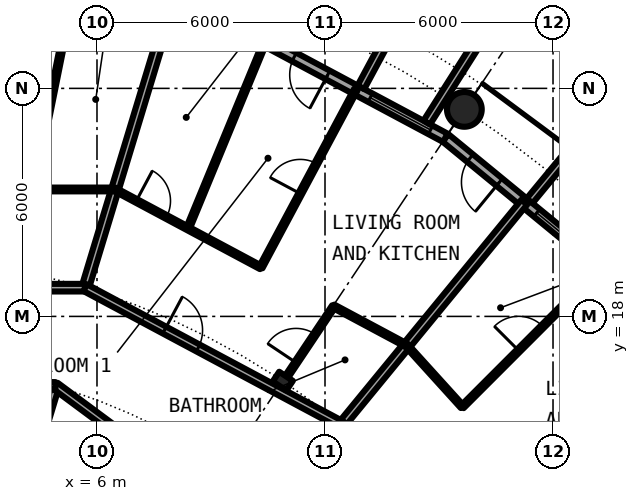
"""IFC4 building model, lengths in metres.
Left out: names, types, materials, properties, quantities, classifications, styles, units other than length and angle.
Written with IfcOpenShell. Run it as: python <this file> out.ifc"""

import sys

from ifc_helpers import new_model, si_unit, direction, frame, frame_2d, origin, origin_2d, place, context, subcontext, project, spatial, rectangle, hollow_circle, i_section, extrude, element, fill, save


model = new_model("IFC4")
c1 = context("Model", 3, precision=1e-05, world=origin(), true_north=direction((0.0, 1.0)))
c2 = subcontext(c1, "Body", "Model", "MODEL_VIEW")
j1 = project(units=[si_unit("LENGTHUNIT", "METRE"), si_unit("PLANEANGLEUNIT", "RADIAN")], contexts=[c1])
p1 = place(None, origin())
s1 = spatial("IfcSite", under=j1, at=p1, CompositionType="ELEMENT")
p2 = place(p1, origin())
s2 = spatial("IfcBuilding", under=s1, at=p2, CompositionType="ELEMENT")
p3 = place(p2, frame((0.0, 0.0, 117.75)))
s3 = spatial("IfcBuildingStorey", under=s2, at=p3, CompositionType="ELEMENT", Elevation=117.75)
p4 = place(p3, frame((15.667, 23.448, 0.0), z_axis=(0.0, 0.0, 1.0), x_axis=(1.0, 0.0, 0.0)))
e1 = element("IfcColumn", 1, at=p4, inside=s3, PredefinedType="COLUMN", context=c2, shape_type="SweptSolid", body=[
    extrude(hollow_circle(Radius=0.457, WallThickness=0.04, at=origin_2d()), origin(), (0.0, 0.0, 1.0), 3.05),
])
p5 = place(p3, frame((10.889, 16.297, 0.0), z_axis=(0.0, 0.0, 1.0), x_axis=(0.55557023302, 0.831469612303, 0.0)))
e2 = element("IfcColumn", 2, at=p5, inside=s3, PredefinedType="COLUMN", context=c2, shape_type="SweptSolid", body=[
    extrude(i_section(OverallWidth=0.307, OverallDepth=0.432, WebThickness=0.021, FlangeThickness=0.04, FilletRadius=0.027, at=origin_2d()), origin(), (0.0, 0.0, 1.0), 3.05),
])
p6 = place(p3, frame((19.304, 19.304, 0.0), z_axis=(0.0, 0.0, 1.0), x_axis=(-0.773019449054, 0.634382322723, 0.0)))
e3 = element("IfcWall", 3, at=p6, inside=s3, PredefinedType="SOLIDWALL", context=c2, shape_type="SweptSolid", body=[
    extrude(rectangle(XDim=5.352, YDim=0.25, at=frame_2d((2.676, 0.0))), origin(), (0.0, 0.0, 1.0), 2.7),
])
p7 = place(p6, frame((0.441, 0.0, 0.3)))
e4 = element("IfcOpeningElement", 4, at=p7, cuts=e3, PredefinedType="OPENING", context=c2, shape_type="SweptSolid", body=[
    extrude(rectangle(XDim=1.8, YDim=2.1, at=frame_2d((0.9, 1.05))), frame((0.0, 0.135, 0.0), z_axis=(0.0, -1.0, 0.0), x_axis=(1.0, 0.0, 0.0)), (0.0, 0.0, 1.0), 0.27),
])
p8 = place(p6, frame((3.51, 0.0, 0.0)))
e5 = element("IfcOpeningElement", 5, at=p8, cuts=e3, PredefinedType="OPENING", context=c2, shape_type="SweptSolid", body=[
    extrude(rectangle(XDim=1.0, YDim=2.2, at=frame_2d((0.5, 1.1))), frame((0.0, 0.135, 0.0), z_axis=(0.0, -1.0, 0.0), x_axis=(1.0, 0.0, 0.0)), (0.0, 0.0, 1.0), 0.27),
])
p9 = place(p3, frame((17.384, 21.041, -0.03), z_axis=(0.0, 0.0, 1.0), x_axis=(0.63709551667, 0.770784861449, 0.0)))
e6 = element("IfcWall", 6, at=p9, inside=s3, PredefinedType="SOLIDWALL", context=c2, shape_type="SweptSolid", body=[
    extrude(rectangle(XDim=3.006, YDim=0.2, at=frame_2d((1.503, 0.0))), origin(), (0.0, 0.0, 1.0), 2.73),
])
p10 = place(p3, frame((15.167, 22.699, 0.0), z_axis=(0.0, 0.0, 1.0), x_axis=(-0.881915646801, 0.471407246368, 0.0)))
e7 = element("IfcWall", 7, at=p10, inside=s3, PredefinedType="SOLIDWALL", context=c2, shape_type="SweptSolid", body=[
    extrude(rectangle(XDim=5.352, YDim=0.25, at=frame_2d((2.676, 0.0))), origin(), (0.0, 0.0, 1.0), 2.7),
])
p11 = place(p10, frame((0.441, 0.0, 0.3)))
e8 = element("IfcOpeningElement", 8, at=p11, cuts=e7, PredefinedType="OPENING", context=c2, shape_type="SweptSolid", body=[
    extrude(rectangle(XDim=1.8, YDim=2.1, at=frame_2d((0.9, 1.05))), frame((0.0, 0.135, 0.0), z_axis=(0.0, -1.0, 0.0), x_axis=(1.0, 0.0, 0.0)), (0.0, 0.0, 1.0), 0.27),
])
p12 = place(p10, frame((3.51, 0.0, 0.0)))
e9 = element("IfcOpeningElement", 9, at=p12, cuts=e7, PredefinedType="OPENING", context=c2, shape_type="SweptSolid", body=[
    extrude(rectangle(XDim=1.0, YDim=2.2, at=frame_2d((0.5, 1.1))), frame((0.0, 0.135, 0.0), z_axis=(0.0, -1.0, 0.0), x_axis=(1.0, 0.0, 0.0)), (0.0, 0.0, 1.0), 0.27),
])
p13 = place(p3, frame((14.678, 23.102, -0.03), z_axis=(0.0, 0.0, 1.0), x_axis=(0.536001536573, 0.844217005746, 0.0)))
e10 = element("IfcWall", 10, at=p13, inside=s3, PredefinedType="SOLIDWALL", context=c2, shape_type="SweptSolid", body=[
    extrude(rectangle(XDim=2.929, YDim=0.2, at=frame_2d((1.465, 0.0))), origin(), (0.0, 0.0, 1.0), 2.73),
])
p14 = place(p3, frame((12.945, 24.029, -0.03), z_axis=(0.0, 0.0, 1.0), x_axis=(0.474424310775, 0.88029629861, 0.0)))
e11 = element("IfcWall", 11, at=p14, inside=s3, PredefinedType="SOLIDWALL", context=c2, shape_type="SweptSolid", body=[
    extrude(rectangle(XDim=3.006, YDim=0.2, at=frame_2d((1.503, 0.0))), origin(), (0.0, 0.0, 1.0), 2.73),
])
p15 = place(p3, frame((2.245, 7.387, 0.0), z_axis=(0.0, 0.0, 1.0), x_axis=(0.289977130626, 0.957033575019, 0.0)))
e12 = element("IfcWall", 12, at=p15, inside=s3, PredefinedType="PARTITIONING", context=c2, shape_type="SweptSolid", body=[
    extrude(rectangle(XDim=9.18, YDim=0.2, at=frame_2d((4.59, 0.0))), origin(), (0.0, 0.0, 1.0), 2.7),
])
p16 = place(p3, frame((5.69, 18.756, 0.0), z_axis=(0.0, 0.0, 1.0), x_axis=(0.29005838641, 0.957008951094, 0.0)))
e13 = element("IfcWall", 13, at=p16, inside=s3, PredefinedType="PARTITIONING", context=c2, shape_type="SweptSolid", body=[
    extrude(rectangle(XDim=7.574, YDim=0.2, at=frame_2d((3.787, 0.0))), origin(), (0.0, 0.0, 1.0), 2.7),
])
p17 = place(p3, frame((4.316, 21.34, 0.0), z_axis=(0.0, 0.0, 1.0), x_axis=(0.198227216881, 0.98015609496, 0.0)))
e14 = element("IfcWall", 14, at=p17, inside=s3, PredefinedType="PARTITIONING", context=c2, shape_type="SweptSolid", body=[
    extrude(rectangle(XDim=5.403, YDim=0.1, at=frame_2d((2.702, 0.0))), origin(), (0.0, 0.0, 1.0), 2.7),
])
p18 = place(p17, frame((2.252, 0.0, 0.0)))
e15 = element("IfcOpeningElement", 15, at=p18, cuts=e14, PredefinedType="OPENING", context=c2, shape_type="SweptSolid", body=[
    extrude(rectangle(XDim=0.9, YDim=2.3, at=frame_2d((0.45, 1.15))), frame((0.0, 0.06, 0.0), z_axis=(0.0, -1.0, 0.0), x_axis=(1.0, 0.0, 0.0)), (0.0, 0.0, 1.0), 0.12),
])
p19 = place(p3, frame((8.392, 20.314, 0.0), z_axis=(0.0, 0.0, 1.0), x_axis=(0.381673756215, 0.924297107978, 0.0)))
e16 = element("IfcWall", 16, at=p19, inside=s3, PredefinedType="PARTITIONING", context=c2, shape_type="SweptSolid", body=[
    extrude(rectangle(XDim=5.195, YDim=0.1, at=frame_2d((2.598, 0.0))), origin(), (0.0, 0.0, 1.0), 2.7),
])
p20 = place(p3, frame((10.31, 19.289, 0.0), z_axis=(0.0, 0.0, 1.0), x_axis=(0.47140999111, 0.881914179658, 0.0)))
e17 = element("IfcWall", 17, at=p20, inside=s3, PredefinedType="PARTITIONING", context=c2, shape_type="SweptSolid", body=[
    extrude(rectangle(XDim=5.303, YDim=0.1, at=frame_2d((2.652, 0.0))), origin(), (0.0, 0.0, 1.0), 2.7),
])
p21 = place(p20, frame((2.202, 0.0, 0.0)))
e18 = element("IfcOpeningElement", 18, at=p21, cuts=e17, PredefinedType="OPENING", context=c2, shape_type="SweptSolid", body=[
    extrude(rectangle(XDim=0.9, YDim=2.3, at=frame_2d((0.45, 1.15))), frame((0.0, 0.06, 0.0), z_axis=(0.0, -1.0, 0.0), x_axis=(1.0, 0.0, 0.0)), (0.0, 0.0, 1.0), 0.12),
])
p22 = place(p3, frame((11.025, 16.466, 0.0), z_axis=(0.0, 0.0, 1.0), x_axis=(0.556469477731, 0.830868052313, 0.0)))
e19 = element("IfcWall", 19, at=p22, inside=s3, PredefinedType="PARTITIONING", context=c2, shape_type="SweptSolid", body=[
    extrude(rectangle(XDim=2.164, YDim=0.1, at=frame_2d((1.082, 0.0))), origin(), (0.0, 0.0, 1.0), 2.7),
])
p23 = place(p22, frame((0.383, 0.0, 0.0)))
e20 = element("IfcOpeningElement", 20, at=p23, cuts=e19, PredefinedType="OPENING", context=c2, shape_type="SweptSolid", body=[
    extrude(rectangle(XDim=0.9, YDim=2.3, at=frame_2d((0.45, 1.15))), frame((0.0, 0.06, 0.0), z_axis=(0.0, -1.0, 0.0), x_axis=(1.0, 0.0, 0.0)), (0.0, 0.0, 1.0), 0.12),
])
p24 = place(p3, frame((12.436, 15.149, 0.0), z_axis=(0.0, 0.0, 1.0), x_axis=(0.63447412651, 0.772944100689, 0.0)))
e21 = element("IfcWall", 21, at=p24, inside=s3, PredefinedType="PARTITIONING", context=c2, shape_type="SweptSolid", body=[
    extrude(rectangle(XDim=7.576, YDim=0.2, at=frame_2d((3.788, 0.0))), origin(), (0.0, 0.0, 1.0), 2.7),
])
p25 = place(p3, frame((15.613, 15.621, 0.0), z_axis=(0.0, 0.0, 1.0), x_axis=(0.706914880313, 0.707298629994, 0.0)))
e22 = element("IfcWall", 22, at=p25, inside=s3, PredefinedType="PARTITIONING", context=c2, shape_type="SweptSolid", body=[
    extrude(rectangle(XDim=5.09, YDim=0.1, at=frame_2d((2.545, 0.0))), origin(), (0.0, 0.0, 1.0), 2.7),
])
p26 = place(p25, frame((2.095, 0.0, 0.0)))
e23 = element("IfcOpeningElement", 23, at=p26, cuts=e22, PredefinedType="OPENING", context=c2, shape_type="SweptSolid", body=[
    extrude(rectangle(XDim=0.9, YDim=2.3, at=frame_2d((0.45, 1.15))), frame((0.0, 0.06, 0.0), z_axis=(0.0, -1.0, 0.0), x_axis=(1.0, 0.0, 0.0)), (0.0, 0.0, 1.0), 0.12),
])
p27 = place(p3, frame((4.906, 16.172, 0.0), z_axis=(0.0, 0.0, 1.0), x_axis=(0.803204584823, -0.59570327758, 0.0)))
e24 = element("IfcWall", 24, at=p27, inside=s3, PredefinedType="PARTITIONING", context=c2, shape_type="SweptSolid", body=[
    extrude(rectangle(XDim=11.387, YDim=0.2, at=frame_2d((5.693, 0.0))), origin(), (0.0, 0.0, 1.0), 2.7),
])
p28 = place(p27, frame((4.38, 0.0, 0.0)))
e25 = element("IfcOpeningElement", 25, at=p28, cuts=e24, PredefinedType="OPENING", context=c2, shape_type="SweptSolid", body=[
    extrude(rectangle(XDim=1.0, YDim=2.3, at=frame_2d((0.5, 1.15))), frame((0.0, 0.11, 0.0), z_axis=(0.0, -1.0, 0.0), x_axis=(1.0, 0.0, 0.0)), (0.0, 0.0, 1.0), 0.22),
])
p29 = place(p3, frame((-4.906, 16.172, 0.0), z_axis=(0.0, 0.0, 1.0), x_axis=(1.0, 0.0, 0.0)))
e26 = element("IfcWall", 26, at=p29, inside=s3, PredefinedType="PARTITIONING", context=c2, shape_type="SweptSolid", body=[
    extrude(rectangle(XDim=9.812, YDim=0.2, at=frame_2d((4.906, 0.0))), origin(), (0.0, 0.0, 1.0), 2.7),
])
p30 = place(p29, frame((4.406, 0.0, 0.0)))
e27 = element("IfcOpeningElement", 27, at=p30, cuts=e26, PredefinedType="OPENING", context=c2, shape_type="SweptSolid", body=[
    extrude(rectangle(XDim=1.0, YDim=2.3, at=frame_2d((0.5, 1.15))), frame((0.0, 0.11, 0.0), z_axis=(0.0, -1.0, 0.0), x_axis=(1.0, 0.0, 0.0)), (0.0, 0.0, 1.0), 0.22),
])
p31 = place(p3, frame((-5.69, 18.756, 0.0), z_axis=(0.0, 0.0, 1.0), x_axis=(1.0, 0.0, 0.0)))
e28 = element("IfcWall", 28, at=p31, inside=s3, PredefinedType="PARTITIONING", context=c2, shape_type="SweptSolid", body=[
    extrude(rectangle(XDim=11.38, YDim=0.2, at=frame_2d((5.69, 0.0))), origin(), (0.0, 0.0, 1.0), 2.7),
])
p32 = place(p31, frame((3.294, 0.0, 0.0)))
e29 = element("IfcOpeningElement", 29, at=p32, cuts=e28, PredefinedType="OPENING", context=c2, shape_type="SweptSolid", body=[
    extrude(rectangle(XDim=1.0, YDim=2.3, at=frame_2d((0.5, 1.15))), frame((0.0, 0.11, 0.0), z_axis=(0.0, -1.0, 0.0), x_axis=(1.0, 0.0, 0.0)), (0.0, 0.0, 1.0), 0.22),
])
p33 = place(p3, frame((5.687, 18.757, 0.0), z_axis=(0.0, 0.0, 1.0), x_axis=(0.8819312112, -0.471378127104, 0.0)))
e30 = element("IfcWall", 30, at=p33, inside=s3, PredefinedType="PARTITIONING", context=c2, shape_type="SweptSolid", body=[
    extrude(rectangle(XDim=7.65, YDim=0.2, at=frame_2d((3.825, 0.0))), origin(), (0.0, 0.0, 1.0), 2.39),
])
p34 = place(p33, frame((2.371, 0.0, 0.0)))
e31 = element("IfcOpeningElement", 31, at=p34, cuts=e30, PredefinedType="OPENING", context=c2, shape_type="SweptSolid", body=[
    extrude(rectangle(XDim=1.0, YDim=2.3, at=frame_2d((0.5, 1.15))), frame((0.0, 0.11, 0.0), z_axis=(0.0, -1.0, 0.0), x_axis=(1.0, 0.0, 0.0)), (0.0, 0.0, 1.0), 0.22),
])
p35 = place(p3, frame((12.434, 15.151, 0.0), z_axis=(0.0, 0.0, 1.0), x_axis=(0.671481997275, -0.741020868354, 0.0)))
e32 = element("IfcWall", 32, at=p35, inside=s3, PredefinedType="PARTITIONING", context=c2, shape_type="SweptSolid", body=[
    extrude(rectangle(XDim=5.596, YDim=0.2, at=frame_2d((2.798, 0.0))), origin(), (0.0, 0.0, 1.0), 2.39),
])
p36 = place(p35, frame((1.417, 0.0, 0.0)))
e33 = element("IfcOpeningElement", 33, at=p36, cuts=e32, PredefinedType="OPENING", context=c2, shape_type="SweptSolid", body=[
    extrude(rectangle(XDim=1.0, YDim=2.3, at=frame_2d((0.5, 1.15))), frame((0.0, 0.11, 0.0), z_axis=(0.0, -1.0, 0.0), x_axis=(1.0, 0.0, 0.0)), (0.0, 0.0, 1.0), 0.22),
])
p37 = place(p3, frame((0.0, 21.34, 0.0), z_axis=(0.0, 0.0, 1.0), x_axis=(1.0, 0.0, 0.0)))
e34 = element("IfcWall", 34, at=p37, inside=s3, PredefinedType="PARTITIONING", context=c2, shape_type="SweptSolid", body=[
    extrude(rectangle(XDim=6.473, YDim=0.1, at=frame_2d((3.236, 0.0))), origin(), (0.0, 0.0, 1.0), 2.7),
])
p38 = place(p3, frame((6.471, 21.341, 0.0), z_axis=(0.0, 0.0, 1.0), x_axis=(0.881932070463, -0.471376519451, 0.0)))
e35 = element("IfcWall", 35, at=p38, inside=s3, PredefinedType="PARTITIONING", context=c2, shape_type="SweptSolid", body=[
    extrude(rectangle(XDim=4.355, YDim=0.1, at=frame_2d((2.178, 0.0))), origin(), (0.0, 0.0, 1.0), 2.7),
])
p39 = place(p38, frame((0.639, 0.0, 0.0)))
e36 = element("IfcOpeningElement", 36, at=p39, cuts=e35, PredefinedType="OPENING", context=c2, shape_type="SweptSolid", body=[
    extrude(rectangle(XDim=0.9, YDim=2.3, at=frame_2d((0.45, 1.15))), frame((0.0, 0.06, 0.0), z_axis=(0.0, -1.0, 0.0), x_axis=(1.0, 0.0, 0.0)), (0.0, 0.0, 1.0), 0.12),
])
p40 = place(p3, frame((12.223, 18.267, 0.0), z_axis=(0.0, 0.0, 1.0), x_axis=(0.881765102974, -0.47168877788, 0.0)))
e37 = element("IfcWall", 37, at=p40, inside=s3, PredefinedType="PARTITIONING", context=c2, shape_type="SweptSolid", body=[
    extrude(rectangle(XDim=2.176, YDim=0.1, at=frame_2d((1.088, 0.0))), origin(), (0.0, 0.0, 1.0), 2.7),
])
p41 = place(p3, frame((14.147, 17.238, 0.0), z_axis=(0.0, 0.0, 1.0), x_axis=(0.671674967707, -0.740845960882, 0.0)))
e38 = element("IfcWall", 38, at=p41, inside=s3, PredefinedType="PARTITIONING", context=c2, shape_type="SweptSolid", body=[
    extrude(rectangle(XDim=2.181, YDim=0.1, at=frame_2d((1.091, 0.0))), origin(), (0.0, 0.0, 1.0), 2.7),
])
p42 = place(p7, origin())
e39 = element("IfcWindow", 39, at=p42, inside=s3, PartitioningType="SINGLE_PANEL", PredefinedType="WINDOW", context=c2, shape_type="SweptSolid", body=[
    extrude(rectangle(XDim=1.8, YDim=2.1, at=frame_2d((0.9, 1.05))), frame((0.0, 0.03, 0.0), z_axis=(0.0, -1.0, 0.0), x_axis=(1.0, 0.0, 0.0)), (0.0, 0.0, 1.0), 0.06),
])
fill(e4, e39)
p43 = place(p8, origin())
e40 = element("IfcDoor", 40, at=p43, inside=s3, OperationType="SINGLE_SWING_LEFT", PredefinedType="DOOR", context=c2, shape_type="SweptSolid", body=[
    extrude(rectangle(XDim=1.0, YDim=2.2, at=frame_2d((0.5, 1.1))), frame((0.0, 0.025, 0.0), z_axis=(0.0, -1.0, 0.0), x_axis=(1.0, 0.0, 0.0)), (0.0, 0.0, 1.0), 0.05),
])
fill(e5, e40)
p44 = place(p11, origin())
e41 = element("IfcWindow", 41, at=p44, inside=s3, PartitioningType="SINGLE_PANEL", PredefinedType="WINDOW", context=c2, shape_type="SweptSolid", body=[
    extrude(rectangle(XDim=1.8, YDim=2.1, at=frame_2d((0.9, 1.05))), frame((0.0, 0.03, 0.0), z_axis=(0.0, -1.0, 0.0), x_axis=(1.0, 0.0, 0.0)), (0.0, 0.0, 1.0), 0.06),
])
fill(e8, e41)
p45 = place(p12, origin())
e42 = element("IfcDoor", 42, at=p45, inside=s3, OperationType="SINGLE_SWING_LEFT", PredefinedType="DOOR", context=c2, shape_type="SweptSolid", body=[
    extrude(rectangle(XDim=1.0, YDim=2.2, at=frame_2d((0.5, 1.1))), frame((0.0, 0.025, 0.0), z_axis=(0.0, -1.0, 0.0), x_axis=(1.0, 0.0, 0.0)), (0.0, 0.0, 1.0), 0.05),
])
fill(e9, e42)
p46 = place(p26, origin())
e43 = element("IfcDoor", 43, at=p46, inside=s3, OperationType="SINGLE_SWING_RIGHT", PredefinedType="DOOR", context=c2, shape_type="SweptSolid", body=[
    extrude(rectangle(XDim=0.9, YDim=2.3, at=frame_2d((0.45, 1.15))), frame((0.0, 0.025, 0.0), z_axis=(0.0, -1.0, 0.0), x_axis=(1.0, 0.0, 0.0)), (0.0, 0.0, 1.0), 0.05),
])
fill(e23, e43)
p47 = place(p34, origin())
e44 = element("IfcDoor", 44, at=p47, inside=s3, OperationType="SINGLE_SWING_LEFT", PredefinedType="DOOR", context=c2, shape_type="SweptSolid", body=[
    extrude(rectangle(XDim=1.0, YDim=2.3, at=frame_2d((0.5, 1.15))), frame((0.0, 0.025, 0.0), z_axis=(0.0, -1.0, 0.0), x_axis=(1.0, 0.0, 0.0)), (0.0, 0.0, 1.0), 0.05),
])
fill(e31, e44)
p48 = place(p23, origin())
e45 = element("IfcDoor", 45, at=p48, inside=s3, OperationType="SINGLE_SWING_LEFT", PredefinedType="DOOR", context=c2, shape_type="SweptSolid", body=[
    extrude(rectangle(XDim=0.9, YDim=2.3, at=frame_2d((0.45, 1.15))), frame((0.0, 0.025, 0.0), z_axis=(0.0, -1.0, 0.0), x_axis=(1.0, 0.0, 0.0)), (0.0, 0.0, 1.0), 0.05),
])
fill(e20, e45)
p49 = place(p21, origin())
e46 = element("IfcDoor", 46, at=p49, inside=s3, OperationType="SINGLE_SWING_RIGHT", PredefinedType="DOOR", context=c2, shape_type="SweptSolid", body=[
    extrude(rectangle(XDim=0.9, YDim=2.3, at=frame_2d((0.45, 1.15))), frame((0.0, 0.025, 0.0), z_axis=(0.0, -1.0, 0.0), x_axis=(1.0, 0.0, 0.0)), (0.0, 0.0, 1.0), 0.05),
])
fill(e18, e46)
p50 = place(p39, origin())
e47 = element("IfcDoor", 47, at=p50, inside=s3, OperationType="SINGLE_SWING_LEFT", PredefinedType="DOOR", context=c2, shape_type="SweptSolid", body=[
    extrude(rectangle(XDim=0.9, YDim=2.3, at=frame_2d((0.45, 1.15))), frame((0.0, 0.025, 0.0), z_axis=(0.0, -1.0, 0.0), x_axis=(1.0, 0.0, 0.0)), (0.0, 0.0, 1.0), 0.05),
])
fill(e36, e47)
p51 = place(p18, origin())
e48 = element("IfcDoor", 48, at=p51, inside=s3, OperationType="SINGLE_SWING_RIGHT", PredefinedType="DOOR", context=c2, shape_type="SweptSolid", body=[
    extrude(rectangle(XDim=0.9, YDim=2.3, at=frame_2d((0.45, 1.15))), frame((0.0, 0.025, 0.0), z_axis=(0.0, -1.0, 0.0), x_axis=(1.0, 0.0, 0.0)), (0.0, 0.0, 1.0), 0.05),
])
fill(e15, e48)
save(model, sys.argv[1])
